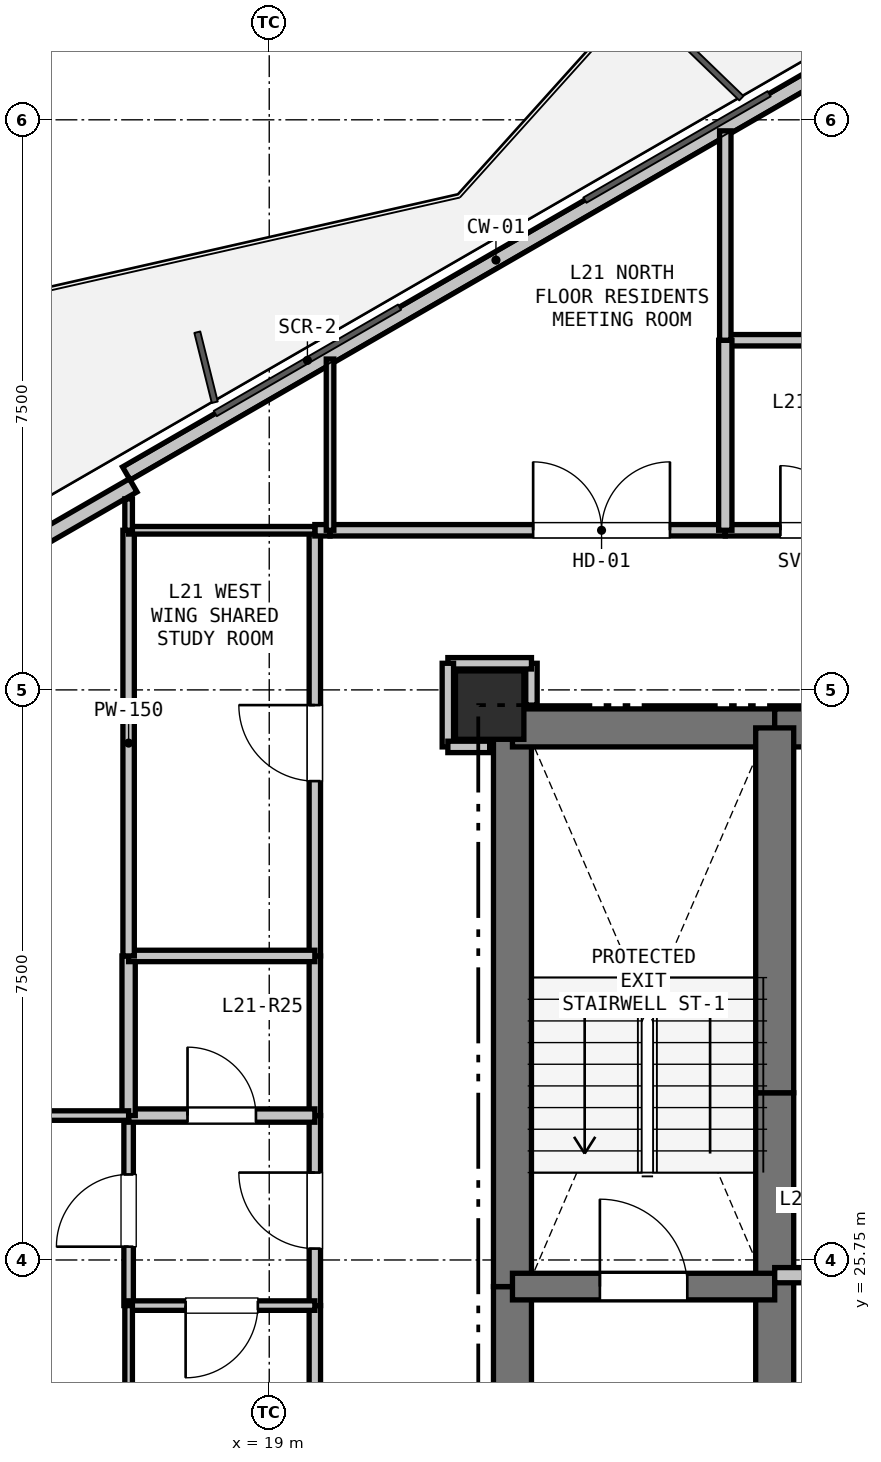
"""IFC4 building model, lengths in metres.
Left out: names, types, materials, properties, quantities, classifications, styles, units other than length and angle.
Written with IfcOpenShell. Run it as: python <this file> out.ifc"""

import sys

from ifc_helpers import new_model, si_unit, direction, frame, frame_2d, origin, origin_2d, place, context, subcontext, project, spatial, rectangle, extrude, element, fill, save


model = new_model("IFC4")
c1 = context("Model", 3, precision=1e-05, world=origin(), true_north=direction((0.0, 1.0)))
c2 = subcontext(c1, "Body", "Model", "MODEL_VIEW")
j1 = project(units=[si_unit("LENGTHUNIT", "METRE"), si_unit("PLANEANGLEUNIT", "RADIAN")], contexts=[c1])
p1 = place(None, origin())
s1 = spatial("IfcSite", under=j1, at=p1, CompositionType="ELEMENT")
p2 = place(p1, origin())
s2 = spatial("IfcBuilding", under=s1, at=p2, CompositionType="ELEMENT")
p3 = place(p2, frame((0.0, 0.0, 80.1)))
s3 = spatial("IfcBuildingStorey", under=s2, at=p3, CompositionType="ELEMENT", Elevation=80.1)
p4 = place(p3, frame((21.9, 33.05, 0.0), z_axis=(0.0, 0.0, 1.0), x_axis=(1.0, 0.0, 0.0)))
e1 = element("IfcColumn", 1, at=p4, inside=s3, PredefinedType="COLUMN", context=c2, shape_type="SweptSolid", body=[
    extrude(rectangle(XDim=0.9, YDim=0.9, at=origin_2d()), origin(), (0.0, 0.0, 1.0), 3.3),
])
p5 = place(p3, frame((17.12, 36.097, 0.0), z_axis=(0.0, 0.0, 1.0), x_axis=(0.866027010039, 0.499997217876, 0.0)))
e2 = element("IfcWall", 2, at=p5, inside=s3, PredefinedType="PARAPET", context=c2, shape_type="SweptSolid", body=[
    extrude(rectangle(XDim=11.229, YDim=0.2, at=frame_2d((5.615, 0.0))), origin(), (0.0, 0.0, 1.0), 0.2),
])
p6 = place(p3, frame((15.738, 35.091, 0.0), z_axis=(0.0, 0.0, 1.0), x_axis=(0.866025371046, 0.500000056704, 0.0)))
e3 = element("IfcWall", 3, at=p6, inside=s3, PredefinedType="PARAPET", context=c2, shape_type="SweptSolid", body=[
    extrude(rectangle(XDim=1.7, YDim=0.2, at=frame_2d((0.85, 0.0))), origin(), (0.0, 0.0, 1.0), 2.67),
])
p7 = place(p3, frame((22.2, 20.75, 0.0), z_axis=(0.0, 0.0, 1.0), x_axis=(0.0, 1.0, 0.0)))
e4 = element("IfcWall", 4, at=p7, inside=s3, PredefinedType="SHEAR", context=c2, shape_type="SweptSolid", body=[
    extrude(rectangle(XDim=4.65, YDim=0.5, at=frame_2d((2.325, 0.0))), origin(), (0.0, 0.0, 1.0), 3.05),
])
p8 = place(p3, frame((22.2, 25.4, 0.0), z_axis=(0.0, 0.0, 1.0), x_axis=(0.0, 1.0, 0.0)))
e5 = element("IfcWall", 5, at=p8, inside=s3, PredefinedType="SHEAR", context=c2, shape_type="SweptSolid", body=[
    extrude(rectangle(XDim=7.35, YDim=0.5, at=frame_2d((3.675, 0.0))), origin(), (0.0, 0.0, 1.0), 3.05),
])
p9 = place(p3, frame((22.2, 32.75, 0.0), z_axis=(0.0, 0.0, 1.0), x_axis=(1.0, 0.0, 0.0)))
e6 = element("IfcWall", 6, at=p9, inside=s3, PredefinedType="SHEAR", context=c2, shape_type="SweptSolid", body=[
    extrude(rectangle(XDim=3.45, YDim=0.5, at=frame_2d((1.725, 0.0))), origin(), (0.0, 0.0, 1.0), 3.05),
])
p10 = place(p3, frame((25.65, 32.75, 0.0), z_axis=(0.0, 0.0, 1.0), x_axis=(1.0, 0.0, 0.0)))
e7 = element("IfcWall", 7, at=p10, inside=s3, PredefinedType="SHEAR", context=c2, shape_type="SweptSolid", body=[
    extrude(rectangle(XDim=1.75, YDim=0.5, at=frame_2d((0.875, 0.0))), origin(), (0.0, 0.0, 1.0), 3.05),
])
p11 = place(p10, frame((0.375, 0.0, 0.0)))
e8 = element("IfcOpeningElement", 8, at=p11, cuts=e7, PredefinedType="OPENING", context=c2, shape_type="SweptSolid", body=[
    extrude(rectangle(XDim=1.0, YDim=2.15, at=frame_2d((0.5, 1.075))), frame((0.0, 0.26, 0.0), z_axis=(0.0, -1.0, 0.0), x_axis=(1.0, 0.0, 0.0)), (0.0, 0.0, 1.0), 0.52),
])
p12 = place(p3, frame((25.65, 22.75, 0.0), z_axis=(0.0, 0.0, 1.0), x_axis=(0.0, 1.0, 0.0)))
e9 = element("IfcWall", 9, at=p12, inside=s3, PredefinedType="SHEAR", context=c2, shape_type="SweptSolid", body=[
    extrude(rectangle(XDim=2.8, YDim=0.5, at=frame_2d((1.4, 0.0))), origin(), (0.0, 0.0, 1.0), 3.05),
])
p13 = place(p3, frame((25.65, 25.55, 0.0), z_axis=(0.0, 0.0, 1.0), x_axis=(0.0, 1.0, 0.0)))
e10 = element("IfcWall", 10, at=p13, inside=s3, PredefinedType="SHEAR", context=c2, shape_type="SweptSolid", body=[
    extrude(rectangle(XDim=2.4, YDim=0.5, at=frame_2d((1.2, 0.0))), origin(), (0.0, 0.0, 1.0), 3.05),
])
p14 = place(p3, frame((25.65, 27.95, 0.0), z_axis=(0.0, 0.0, 1.0), x_axis=(0.0, 1.0, 0.0)))
e11 = element("IfcWall", 11, at=p14, inside=s3, PredefinedType="SHEAR", context=c2, shape_type="SweptSolid", body=[
    extrude(rectangle(XDim=4.8, YDim=0.5, at=frame_2d((2.4, 0.0))), origin(), (0.0, 0.0, 1.0), 3.05),
])
p15 = place(p3, frame((22.2, 25.4, 0.0), z_axis=(0.0, 0.0, 1.0), x_axis=(1.0, 0.0, 0.0)))
e12 = element("IfcWall", 12, at=p15, inside=s3, PredefinedType="SHEAR", context=c2, shape_type="SweptSolid", body=[
    extrude(rectangle(XDim=3.45, YDim=0.35, at=frame_2d((1.725, 0.0))), origin(), (0.0, 0.0, 1.0), 3.05),
])
p16 = place(p15, frame((1.15, 0.0, 0.0)))
e13 = element("IfcOpeningElement", 13, at=p16, cuts=e12, PredefinedType="OPENING", context=c2, shape_type="SweptSolid", body=[
    extrude(rectangle(XDim=1.15, YDim=2.15, at=frame_2d((0.575, 1.075))), frame((0.0, 0.185, 0.0), z_axis=(0.0, -1.0, 0.0), x_axis=(1.0, 0.0, 0.0)), (0.0, 0.0, 1.0), 0.37),
])
p17 = place(p3, frame((25.65, 25.55, 0.0), z_axis=(0.0, 0.0, 1.0), x_axis=(1.0, 0.0, 0.0)))
e14 = element("IfcWall", 14, at=p17, inside=s3, PredefinedType="PARTITIONING", context=c2, shape_type="SweptSolid", body=[
    extrude(rectangle(XDim=4.95, YDim=0.2, at=frame_2d((2.475, 0.0))), origin(), (0.0, 0.0, 1.0), 3.05),
])
p18 = place(p3, frame((19.6, 21.15, 0.0), z_axis=(0.0, 0.0, 1.0), x_axis=(0.0, 1.0, 0.0)))
e15 = element("IfcWall", 15, at=p18, inside=s3, PredefinedType="PARTITIONING", context=c2, shape_type="SweptSolid", body=[
    extrude(rectangle(XDim=4.0, YDim=0.15, at=frame_2d((2.0, 0.0))), origin(), (0.0, 0.0, 1.0), 2.423),
])
p19 = place(p3, frame((19.6, 25.15, 0.0), z_axis=(0.0, 0.0, 1.0), x_axis=(0.0, 1.0, 0.0)))
e16 = element("IfcWall", 16, at=p19, inside=s3, PredefinedType="PARTITIONING", context=c2, shape_type="SweptSolid", body=[
    extrude(rectangle(XDim=2.5, YDim=0.15, at=frame_2d((1.25, 0.0))), origin(), (0.0, 0.0, 1.0), 3.05),
])
p20 = place(p19, frame((0.75, 0.0, 0.0)))
e17 = element("IfcOpeningElement", 17, at=p20, cuts=e16, PredefinedType="OPENING", context=c2, shape_type="SweptSolid", body=[
    extrude(rectangle(XDim=1.0, YDim=2.15, at=frame_2d((0.5, 1.075))), frame((0.0, 0.085, 0.0), z_axis=(0.0, -1.0, 0.0), x_axis=(1.0, 0.0, 0.0)), (0.0, 0.0, 1.0), 0.17),
])
p21 = place(p3, frame((19.6, 27.65, 0.0), z_axis=(0.0, 0.0, 1.0), x_axis=(0.0, 1.0, 0.0)))
e18 = element("IfcWall", 18, at=p21, inside=s3, PredefinedType="PARTITIONING", context=c2, shape_type="SweptSolid", body=[
    extrude(rectangle(XDim=2.1, YDim=0.15, at=frame_2d((1.05, 0.0))), origin(), (0.0, 0.0, 1.0), 3.05),
])
p22 = place(p3, frame((19.6, 29.75, 0.0), z_axis=(0.0, 0.0, 1.0), x_axis=(0.0, 1.0, 0.0)))
e19 = element("IfcWall", 19, at=p22, inside=s3, PredefinedType="PARTITIONING", context=c2, shape_type="SweptSolid", body=[
    extrude(rectangle(XDim=5.6, YDim=0.15, at=frame_2d((2.8, 0.0))), origin(), (0.0, 0.0, 1.0), 2.423),
])
p23 = place(p22, frame((2.3, 0.0, 0.0)))
e20 = element("IfcOpeningElement", 20, at=p23, cuts=e19, PredefinedType="OPENING", context=c2, shape_type="SweptSolid", body=[
    extrude(rectangle(XDim=1.0, YDim=2.15, at=frame_2d((0.5, 1.075))), frame((0.0, 0.085, 0.0), z_axis=(0.0, -1.0, 0.0), x_axis=(1.0, 0.0, 0.0)), (0.0, 0.0, 1.0), 0.17),
])
p24 = place(p3, frame((19.6, 35.35, 0.0), z_axis=(0.0, 0.0, 1.0), x_axis=(1.0, 0.0, 0.0)))
e21 = element("IfcWall", 21, at=p24, inside=s3, PredefinedType="PARTITIONING", context=c2, shape_type="SweptSolid", body=[
    extrude(rectangle(XDim=0.2, YDim=0.15, at=frame_2d((0.1, 0.0))), origin(), (0.0, 0.0, 1.0), 3.05),
])
p25 = place(p3, frame((19.8, 35.35, 0.0), z_axis=(0.0, 0.0, 1.0), x_axis=(1.0, 0.0, 0.0)))
e22 = element("IfcWall", 22, at=p25, inside=s3, PredefinedType="PARTITIONING", context=c2, shape_type="SweptSolid", body=[
    extrude(rectangle(XDim=5.2, YDim=0.15, at=frame_2d((2.6, 0.0))), origin(), (0.0, 0.0, 1.0), 3.05),
])
p26 = place(p25, frame((2.672, 0.0, 0.0)))
e23 = element("IfcOpeningElement", 23, at=p26, cuts=e22, PredefinedType="OPENING", context=c2, shape_type="SweptSolid", body=[
    extrude(rectangle(XDim=1.8, YDim=2.2, at=frame_2d((0.9, 1.1))), frame((0.0, 0.085, 0.0), z_axis=(0.0, -1.0, 0.0), x_axis=(1.0, 0.0, 0.0)), (0.0, 0.0, 1.0), 0.17),
])
p27 = place(p3, frame((25.0, 35.35, 0.0), z_axis=(0.0, 0.0, 1.0), x_axis=(1.0, 0.0, 0.0)))
e24 = element("IfcWall", 24, at=p27, inside=s3, PredefinedType="PARTITIONING", context=c2, shape_type="SweptSolid", body=[
    extrude(rectangle(XDim=2.3, YDim=0.15, at=frame_2d((1.15, 0.0))), origin(), (0.0, 0.0, 1.0), 3.05),
])
p28 = place(p27, frame((0.725, 0.0, 0.0)))
e25 = element("IfcOpeningElement", 25, at=p28, cuts=e24, PredefinedType="OPENING", context=c2, shape_type="SweptSolid", body=[
    extrude(rectangle(XDim=0.85, YDim=2.1, at=frame_2d((0.425, 1.05))), frame((0.0, 0.085, 0.0), z_axis=(0.0, -1.0, 0.0), x_axis=(1.0, 0.0, 0.0)), (0.0, 0.0, 1.0), 0.17),
])
p29 = place(p3, frame((22.45, 33.05, 0.0), z_axis=(0.0, 0.0, 1.0), x_axis=(0.0, 1.0, 0.0)))
e26 = element("IfcWall", 26, at=p29, inside=s3, PredefinedType="PARTITIONING", context=c2, shape_type="SweptSolid", body=[
    extrude(rectangle(XDim=0.55, YDim=0.15, at=frame_2d((0.275, 0.0))), origin(), (0.0, 0.0, 1.0), 2.498),
])
p30 = place(p3, frame((22.45, 33.6, 0.0), z_axis=(0.0, 0.0, 1.0), x_axis=(-1.0, 0.0, 0.0)))
e27 = element("IfcWall", 27, at=p30, inside=s3, PredefinedType="PARTITIONING", context=c2, shape_type="SweptSolid", body=[
    extrude(rectangle(XDim=1.1, YDim=0.15, at=frame_2d((0.55, 0.0))), origin(), (0.0, 0.0, 1.0), 3.05),
])
p31 = place(p3, frame((21.35, 33.6, 0.0), z_axis=(0.0, 0.0, 1.0), x_axis=(0.0, -1.0, 0.0)))
e28 = element("IfcWall", 28, at=p31, inside=s3, PredefinedType="PARTITIONING", context=c2, shape_type="SweptSolid", body=[
    extrude(rectangle(XDim=1.1, YDim=0.15, at=frame_2d((0.55, 0.0))), origin(), (0.0, 0.0, 1.0), 2.423),
])
p32 = place(p3, frame((21.35, 32.5, 0.0), z_axis=(0.0, 0.0, 1.0), x_axis=(1.0, 0.0, 0.0)))
e29 = element("IfcWall", 29, at=p32, inside=s3, PredefinedType="PARTITIONING", context=c2, shape_type="SweptSolid", body=[
    extrude(rectangle(XDim=0.55, YDim=0.15, at=frame_2d((0.275, 0.0))), origin(), (0.0, 0.0, 1.0), 2.498),
])
p33 = place(p3, frame((17.15, 25.15, 0.0), z_axis=(0.0, 0.0, 1.0), x_axis=(0.0, 1.0, 0.0)))
e30 = element("IfcWall", 30, at=p33, inside=s3, PredefinedType="PARTITIONING", context=c2, shape_type="SweptSolid", body=[
    extrude(rectangle(XDim=2.5, YDim=0.125, at=frame_2d((1.25, 0.0))), origin(), (0.0, 0.0, 1.0), 3.05),
])
p34 = place(p33, frame((0.775, 0.0, 0.0)))
e31 = element("IfcOpeningElement", 31, at=p34, cuts=e30, PredefinedType="OPENING", context=c2, shape_type="SweptSolid", body=[
    extrude(rectangle(XDim=0.95, YDim=2.1, at=frame_2d((0.475, 1.05))), frame((0.0, 0.073, 0.0), z_axis=(0.0, -1.0, 0.0), x_axis=(1.0, 0.0, 0.0)), (0.0, 0.0, 1.0), 0.145),
])
p35 = place(p3, frame((17.15, 27.65, 0.0), z_axis=(0.0, 0.0, 1.0), x_axis=(1.0, 0.0, 0.0)))
e32 = element("IfcWall", 32, at=p35, inside=s3, PredefinedType="PLUMBINGWALL", context=c2, shape_type="SweptSolid", body=[
    extrude(rectangle(XDim=2.45, YDim=0.175, at=frame_2d((1.225, 0.0))), origin(), (0.0, 0.0, 1.0), 3.05),
])
p36 = place(p35, frame((0.775, 0.0, 0.0)))
e33 = element("IfcOpeningElement", 33, at=p36, cuts=e32, PredefinedType="OPENING", context=c2, shape_type="SweptSolid", body=[
    extrude(rectangle(XDim=0.9, YDim=2.1, at=frame_2d((0.45, 1.05))), frame((0.0, 0.097, 0.0), z_axis=(0.0, -1.0, 0.0), x_axis=(1.0, 0.0, 0.0)), (0.0, 0.0, 1.0), 0.195),
])
p37 = place(p3, frame((19.6, 25.15, 0.0), z_axis=(0.0, 0.0, 1.0), x_axis=(-1.0, 0.0, 0.0)))
e34 = element("IfcWall", 34, at=p37, inside=s3, PredefinedType="PARTITIONING", context=c2, shape_type="SweptSolid", body=[
    extrude(rectangle(XDim=2.45, YDim=0.125, at=frame_2d((1.225, 0.0))), origin(), (0.0, 0.0, 1.0), 3.05),
])
p38 = place(p37, frame((0.75, 0.0, 0.0)))
e35 = element("IfcOpeningElement", 35, at=p38, cuts=e34, PredefinedType="OPENING", context=c2, shape_type="SweptSolid", body=[
    extrude(rectangle(XDim=0.95, YDim=2.1, at=frame_2d((0.475, 1.05))), frame((0.0, 0.073, 0.0), z_axis=(0.0, -1.0, 0.0), x_axis=(1.0, 0.0, 0.0)), (0.0, 0.0, 1.0), 0.145),
])
p39 = place(p3, frame((25.0, 37.85, 0.0), z_axis=(0.0, 0.0, 1.0), x_axis=(1.0, 0.0, 0.0)))
e36 = element("IfcWall", 36, at=p39, inside=s3, PredefinedType="PARTITIONING", context=c2, shape_type="SweptSolid", body=[
    extrude(rectangle(XDim=2.3, YDim=0.15, at=frame_2d((1.15, 0.0))), origin(), (0.0, 0.0, 1.0), 3.05),
])
p40 = place(p3, frame((25.0, 35.35, 0.0), z_axis=(0.0, 0.0, 1.0), x_axis=(0.0, 1.0, 0.0)))
e37 = element("IfcWall", 37, at=p40, inside=s3, PredefinedType="PLUMBINGWALL", context=c2, shape_type="SweptSolid", body=[
    extrude(rectangle(XDim=2.5, YDim=0.175, at=frame_2d((1.25, 0.0))), origin(), (0.0, 0.0, 1.0), 3.05),
])
p41 = place(p3, frame((17.15, 27.65, 0.0), z_axis=(0.0, 0.0, 1.0), x_axis=(0.0, 1.0, 0.0)))
e38 = element("IfcWall", 38, at=p41, inside=s3, PredefinedType="PLUMBINGWALL", context=c2, shape_type="SweptSolid", body=[
    extrude(rectangle(XDim=2.1, YDim=0.175, at=frame_2d((1.05, 0.0))), origin(), (0.0, 0.0, 1.0), 3.05),
])
p42 = place(p3, frame((17.15, 29.75, 0.0), z_axis=(0.0, 0.0, 1.0), x_axis=(1.0, 0.0, 0.0)))
e39 = element("IfcWall", 39, at=p42, inside=s3, PredefinedType="PARTITIONING", context=c2, shape_type="SweptSolid", body=[
    extrude(rectangle(XDim=2.45, YDim=0.15, at=frame_2d((1.225, 0.0))), origin(), (0.0, 0.0, 1.0), 3.05),
])
p43 = place(p3, frame((17.15, 21.15, 0.0), z_axis=(0.0, 0.0, 1.0), x_axis=(0.0, 1.0, 0.0)))
e40 = element("IfcWall", 40, at=p43, inside=s3, PredefinedType="PARTITIONING", context=c2, shape_type="SweptSolid", body=[
    extrude(rectangle(XDim=4.0, YDim=0.1, at=frame_2d((2.0, 0.0))), origin(), (0.0, 0.0, 1.0), 2.423),
])
p44 = place(p43, frame((1.525, 0.0, 0.0)))
e41 = element("IfcOpeningElement", 41, at=p44, cuts=e40, PredefinedType="OPENING", context=c2, shape_type="SweptSolid", body=[
    extrude(rectangle(XDim=0.95, YDim=2.1, at=frame_2d((0.475, 1.05))), frame((0.0, 0.06, 0.0), z_axis=(0.0, -1.0, 0.0), x_axis=(1.0, 0.0, 0.0)), (0.0, 0.0, 1.0), 0.12),
])
p45 = place(p3, frame((25.0, 40.605, 0.0), z_axis=(0.0, 0.0, 1.0), x_axis=(0.0, -1.0, 0.0)))
e42 = element("IfcWall", 42, at=p45, inside=s3, PredefinedType="PARTITIONING", context=c2, shape_type="SweptSolid", body=[
    extrude(rectangle(XDim=2.755, YDim=0.15, at=frame_2d((1.377, 0.0))), origin(), (0.0, 0.0, 1.0), 2.365),
])
p46 = place(p3, frame((19.8, 35.35, 0.0), z_axis=(0.0, 0.0, 1.0), x_axis=(0.0, 1.0, 0.0)))
e43 = element("IfcWall", 43, at=p46, inside=s3, PredefinedType="PARTITIONING", context=c2, shape_type="SweptSolid", body=[
    extrude(rectangle(XDim=2.252, YDim=0.1, at=frame_2d((1.126, 0.0))), origin(), (0.0, 0.0, 1.0), 2.365),
])
p47 = place(p3, frame((17.15, 29.75, 0.0), z_axis=(0.0, 0.0, 1.0), x_axis=(0.0, 1.0, 0.0)))
e44 = element("IfcWall", 44, at=p47, inside=s3, PredefinedType="PARTITIONING", context=c2, shape_type="SweptSolid", body=[
    extrude(rectangle(XDim=5.6, YDim=0.15, at=frame_2d((2.8, 0.0))), origin(), (0.0, 0.0, 1.0), 2.365),
])
p48 = place(p3, frame((17.15, 35.35, 0.0), z_axis=(0.0, 0.0, 1.0), x_axis=(1.0, 0.0, 0.0)))
e45 = element("IfcWall", 45, at=p48, inside=s3, PredefinedType="PARTITIONING", context=c2, shape_type="SweptSolid", body=[
    extrude(rectangle(XDim=2.45, YDim=0.1, at=frame_2d((1.225, 0.0))), origin(), (0.0, 0.0, 1.0), 2.365),
])
p49 = place(p3, frame((17.15, 35.763, 0.0), z_axis=(0.0, 0.0, 1.0), x_axis=(0.0, -1.0, 0.0)))
e46 = element("IfcWall", 46, at=p49, inside=s3, PredefinedType="PARTITIONING", context=c2, shape_type="SweptSolid", body=[
    extrude(rectangle(XDim=0.413, YDim=0.1, at=frame_2d((0.207, 0.0))), origin(), (0.0, 0.0, 1.0), 2.365),
])
p50 = place(p3, frame((17.15, 27.65, 0.0), z_axis=(0.0, 0.0, 1.0), x_axis=(-1.0, 0.0, 0.0)))
e47 = element("IfcWall", 47, at=p50, inside=s3, PredefinedType="PARTITIONING", context=c2, shape_type="SweptSolid", body=[
    extrude(rectangle(XDim=5.98, YDim=0.125, at=frame_2d((2.99, 0.0))), origin(), (0.0, 0.0, 1.0), 3.05),
])
p51 = place(p50, frame((2.515, 0.0, 0.0)))
e48 = element("IfcOpeningElement", 48, at=p51, cuts=e47, PredefinedType="OPENING", context=c2, shape_type="SweptSolid", body=[
    extrude(rectangle(XDim=0.95, YDim=2.1, at=frame_2d((0.475, 1.05))), frame((0.0, 0.073, 0.0), z_axis=(0.0, -1.0, 0.0), x_axis=(1.0, 0.0, 0.0)), (0.0, 0.0, 1.0), 0.145),
])
p52 = place(p16, origin())
e49 = element("IfcDoor", 49, at=p52, inside=s3, OperationType="SINGLE_SWING_LEFT", PredefinedType="DOOR", context=c2, shape_type="SweptSolid", body=[
    extrude(rectangle(XDim=1.15, YDim=2.15, at=frame_2d((0.575, 1.075))), frame((0.0, 0.025, 0.0), z_axis=(0.0, -1.0, 0.0), x_axis=(1.0, 0.0, 0.0)), (0.0, 0.0, 1.0), 0.05),
])
fill(e13, e49)
p53 = place(p20, origin())
e50 = element("IfcDoor", 50, at=p53, inside=s3, OperationType="SINGLE_SWING_RIGHT", PredefinedType="DOOR", context=c2, shape_type="SweptSolid", body=[
    extrude(rectangle(XDim=1.0, YDim=2.15, at=frame_2d((0.5, 1.075))), frame((0.0, 0.025, 0.0), z_axis=(0.0, -1.0, 0.0), x_axis=(1.0, 0.0, 0.0)), (0.0, 0.0, 1.0), 0.05),
])
fill(e17, e50)
p54 = place(p28, origin())
e51 = element("IfcDoor", 51, at=p54, inside=s3, OperationType="SINGLE_SWING_LEFT", PredefinedType="DOOR", context=c2, shape_type="SweptSolid", body=[
    extrude(rectangle(XDim=0.85, YDim=2.1, at=frame_2d((0.425, 1.05))), frame((0.0, 0.025, 0.0), z_axis=(0.0, -1.0, 0.0), x_axis=(1.0, 0.0, 0.0)), (0.0, 0.0, 1.0), 0.05),
])
fill(e25, e51)
p55 = place(p26, origin())
e52 = element("IfcDoor", 52, at=p55, inside=s3, OperationType="DOUBLE_DOOR_SINGLE_SWING", PredefinedType="DOOR", context=c2, shape_type="SweptSolid", body=[
    extrude(rectangle(XDim=1.8, YDim=2.2, at=frame_2d((0.9, 1.1))), frame((0.0, 0.025, 0.0), z_axis=(0.0, -1.0, 0.0), x_axis=(1.0, 0.0, 0.0)), (0.0, 0.0, 1.0), 0.05),
])
fill(e23, e52)
p56 = place(p23, origin())
e53 = element("IfcDoor", 53, at=p56, inside=s3, OperationType="SINGLE_SWING_RIGHT", PredefinedType="DOOR", context=c2, shape_type="SweptSolid", body=[
    extrude(rectangle(XDim=1.0, YDim=2.15, at=frame_2d((0.5, 1.075))), frame((0.0, 0.025, 0.0), z_axis=(0.0, -1.0, 0.0), x_axis=(1.0, 0.0, 0.0)), (0.0, 0.0, 1.0), 0.05),
])
fill(e20, e53)
p57 = place(p36, origin())
e54 = element("IfcDoor", 54, at=p57, inside=s3, OperationType="SINGLE_SWING_LEFT", PredefinedType="DOOR", context=c2, shape_type="SweptSolid", body=[
    extrude(rectangle(XDim=0.9, YDim=2.1, at=frame_2d((0.45, 1.05))), frame((0.0, 0.025, 0.0), z_axis=(0.0, -1.0, 0.0), x_axis=(1.0, 0.0, 0.0)), (0.0, 0.0, 1.0), 0.05),
])
fill(e33, e54)
p58 = place(p38, origin())
e55 = element("IfcDoor", 55, at=p58, inside=s3, OperationType="SINGLE_SWING_RIGHT", PredefinedType="DOOR", context=c2, shape_type="SweptSolid", body=[
    extrude(rectangle(XDim=0.95, YDim=2.1, at=frame_2d((0.475, 1.05))), frame((0.0, 0.025, 0.0), z_axis=(0.0, -1.0, 0.0), x_axis=(1.0, 0.0, 0.0)), (0.0, 0.0, 1.0), 0.05),
])
fill(e35, e55)
p59 = place(p34, origin())
e56 = element("IfcDoor", 56, at=p59, inside=s3, OperationType="SINGLE_SWING_LEFT", PredefinedType="DOOR", context=c2, shape_type="SweptSolid", body=[
    extrude(rectangle(XDim=0.95, YDim=2.1, at=frame_2d((0.475, 1.05))), frame((0.0, 0.025, 0.0), z_axis=(0.0, -1.0, 0.0), x_axis=(1.0, 0.0, 0.0)), (0.0, 0.0, 1.0), 0.05),
])
fill(e31, e56)
save(model, sys.argv[1])
